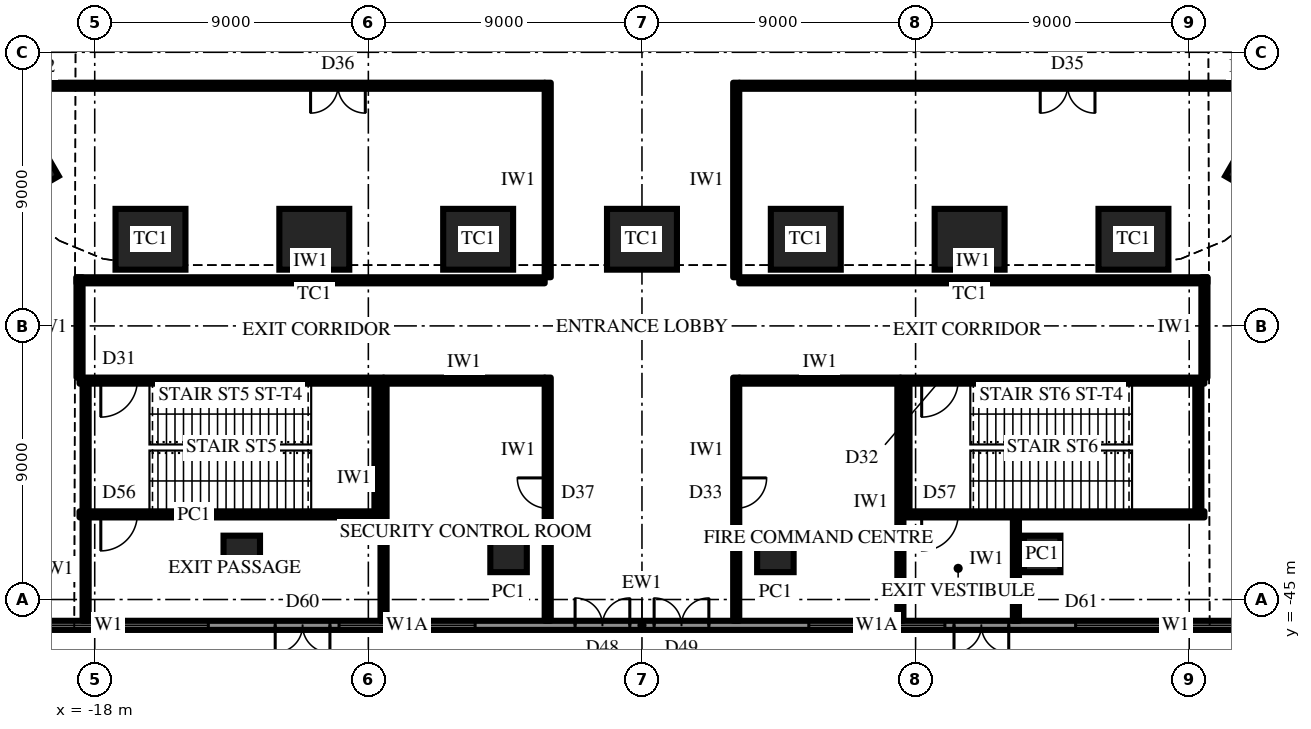
"""IFC4 building model, lengths in metres.
Left out: names, types, materials, properties, quantities, classifications, styles, units other than length and angle.
Written with IfcOpenShell. Run it as: python <this file> out.ifc"""

import sys

from ifc_helpers import new_model, si_unit, direction, frame, frame_2d, origin, origin_2d, place, context, subcontext, project, spatial, rectangle, extrude, element, fill, save


model = new_model("IFC4")
c1 = context("Model", 3, precision=1e-05, world=origin(), true_north=direction((0.0, 1.0)))
c2 = subcontext(c1, "Body", "Model", "MODEL_VIEW")
j1 = project(units=[si_unit("LENGTHUNIT", "METRE"), si_unit("PLANEANGLEUNIT", "RADIAN")], contexts=[c1])
p1 = place(None, origin())
s1 = spatial("IfcSite", under=j1, at=p1, CompositionType="ELEMENT")
p2 = place(p1, origin())
s2 = spatial("IfcBuilding", under=s1, at=p2, CompositionType="ELEMENT")
p3 = place(p2, origin())
s3 = spatial("IfcBuildingStorey", under=s2, at=p3, CompositionType="ELEMENT", Elevation=0.0)
for number, where, z_axis, x_axis in (
    (1, (-20.626, -30.575, 0.0), (0.0, 0.0, 1.0), (0.5, -0.866, 0.0)),
    (2, (-16.166, -33.15, 0.0), (0.0, 0.0, 1.0), (1.0, 0.0, 0.0)),
    (3, (-10.777, -33.15, 0.0), (0.0, 0.0, 1.0), (1.0, 0.0, 0.0)),
    (4, (-5.389, -33.15, 0.0), (0.0, 0.0, 1.0), (1.0, 0.0, 0.0)),
    (5, (0.0, -33.15, 0.0), (0.0, 0.0, 1.0), (1.0, 0.0, 0.0)),
    (6, (5.389, -33.15, 0.0), (0.0, 0.0, 1.0), (1.0, 0.0, 0.0)),
    (7, (10.777, -33.15, 0.0), (0.0, 0.0, 1.0), (1.0, 0.0, 0.0)),
    (8, (16.166, -33.15, 0.0), (0.0, 0.0, 1.0), (1.0, 0.0, 0.0)),
    (9, (20.626, -30.575, 0.0), (0.0, 0.0, 1.0), (0.5, 0.866, 0.0)),
):
    element("IfcColumn", number, at=place(p3, frame(where, z_axis=z_axis, x_axis=x_axis)), inside=s3, PredefinedType="COLUMN", context=c2, shape_type="SweptSolid", body=[
        extrude(rectangle(XDim=2.3, YDim=2.0, at=origin_2d()), origin(), (0.0, 0.0, 1.0), 7.0),
    ])
p4 = place(p3, frame((-18.5, -42.2, 0.0), z_axis=(0.0, 0.0, 1.0), x_axis=(1.0, 0.0, 0.0)))
e10 = element("IfcWall", 10, at=p4, inside=s3, PredefinedType="SHEAR", context=c2, shape_type="SweptSolid", body=[
    extrude(rectangle(XDim=10.0, YDim=0.2, at=frame_2d((5.0, 0.0))), origin(), (0.0, 0.0, 1.0), 7.0),
])
p5 = place(p4, frame((0.7, 0.0, 0.0)))
e11 = element("IfcOpeningElement", 11, at=p5, cuts=e10, PredefinedType="OPENING", context=c2, shape_type="SweptSolid", body=[
    extrude(rectangle(XDim=1.2, YDim=2.2, at=frame_2d((0.6, 1.1))), frame((0.0, 0.11, 0.0), z_axis=(0.0, -1.0, 0.0), x_axis=(1.0, 0.0, 0.0)), (0.0, 0.0, 1.0), 0.22),
])
p6 = place(p3, frame((-8.5, -37.8, 0.0), z_axis=(0.0, 0.0, 1.0), x_axis=(-1.0, 0.0, 0.0)))
e12 = element("IfcWall", 12, at=p6, inside=s3, PredefinedType="SHEAR", context=c2, shape_type="SweptSolid", body=[
    extrude(rectangle(XDim=10.0, YDim=0.2, at=frame_2d((5.0, 0.0))), origin(), (0.0, 0.0, 1.0), 7.0),
])
p7 = place(p6, frame((8.1, 0.0, 0.0)))
e13 = element("IfcOpeningElement", 13, at=p7, cuts=e12, PredefinedType="OPENING", context=c2, shape_type="SweptSolid", body=[
    extrude(rectangle(XDim=1.2, YDim=2.2, at=frame_2d((0.6, 1.1))), frame((0.0, 0.11, 0.0), z_axis=(0.0, -1.0, 0.0), x_axis=(1.0, 0.0, 0.0)), (0.0, 0.0, 1.0), 0.22),
])
for number, where, z_axis, x_axis in (
    (14, (-18.3, -37.9, 0.0), (0.0, 0.0, 1.0), (0.0, -1.0, 0.0)),
    (15, (-8.7, -42.1, 0.0), (0.0, 0.0, 1.0), (0.0, 1.0, 0.0)),
):
    element("IfcWall", number, at=place(p3, frame(where, z_axis=z_axis, x_axis=x_axis)), inside=s3, PredefinedType="SHEAR", context=c2, shape_type="SweptSolid", body=[
        extrude(rectangle(XDim=4.2, YDim=0.2, at=frame_2d((2.1, 0.0))), origin(), (0.0, 0.0, 1.0), 7.0),
    ])
p8 = place(p3, frame((8.5, -42.2, 0.0), z_axis=(0.0, 0.0, 1.0), x_axis=(1.0, 0.0, 0.0)))
e16 = element("IfcWall", 16, at=p8, inside=s3, PredefinedType="SHEAR", context=c2, shape_type="SweptSolid", body=[
    extrude(rectangle(XDim=10.0, YDim=0.2, at=frame_2d((5.0, 0.0))), origin(), (0.0, 0.0, 1.0), 7.0),
])
p9 = place(p8, frame((0.7, 0.0, 0.0)))
e17 = element("IfcOpeningElement", 17, at=p9, cuts=e16, PredefinedType="OPENING", context=c2, shape_type="SweptSolid", body=[
    extrude(rectangle(XDim=1.2, YDim=2.2, at=frame_2d((0.6, 1.1))), frame((0.0, 0.11, 0.0), z_axis=(0.0, -1.0, 0.0), x_axis=(1.0, 0.0, 0.0)), (0.0, 0.0, 1.0), 0.22),
])
p10 = place(p3, frame((18.5, -37.8, 0.0), z_axis=(0.0, 0.0, 1.0), x_axis=(-1.0, 0.0, 0.0)))
e18 = element("IfcWall", 18, at=p10, inside=s3, PredefinedType="SHEAR", context=c2, shape_type="SweptSolid", body=[
    extrude(rectangle(XDim=10.0, YDim=0.2, at=frame_2d((5.0, 0.0))), origin(), (0.0, 0.0, 1.0), 7.0),
])
p11 = place(p10, frame((8.1, 0.0, 0.0)))
e19 = element("IfcOpeningElement", 19, at=p11, cuts=e18, PredefinedType="OPENING", context=c2, shape_type="SweptSolid", body=[
    extrude(rectangle(XDim=1.2, YDim=2.2, at=frame_2d((0.6, 1.1))), frame((0.0, 0.11, 0.0), z_axis=(0.0, -1.0, 0.0), x_axis=(1.0, 0.0, 0.0)), (0.0, 0.0, 1.0), 0.22),
])
for number, where, z_axis, x_axis in (
    (20, (8.7, -37.9, 0.0), (0.0, 0.0, 1.0), (0.0, -1.0, 0.0)),
    (21, (18.3, -42.1, 0.0), (0.0, 0.0, 1.0), (0.0, 1.0, 0.0)),
):
    element("IfcWall", number, at=place(p3, frame(where, z_axis=z_axis, x_axis=x_axis)), inside=s3, PredefinedType="SHEAR", context=c2, shape_type="SweptSolid", body=[
        extrude(rectangle(XDim=4.2, YDim=0.2, at=frame_2d((2.1, 0.0))), origin(), (0.0, 0.0, 1.0), 7.0),
    ])
for number, where, z_axis, x_axis in (
    (22, (-13.164, -43.5, 0.0), (0.0, 0.0, 1.0), (1.0, 0.0, 0.0)),
    (23, (-4.388, -43.5, 0.0), (0.0, 0.0, 1.0), (1.0, 0.0, 0.0)),
    (24, (4.388, -43.5, 0.0), (0.0, 0.0, 1.0), (1.0, 0.0, 0.0)),
    (25, (13.164, -43.5, 0.0), (0.0, 0.0, 1.0), (1.0, 0.0, 0.0)),
):
    element("IfcColumn", number, at=place(p3, frame(where, z_axis=z_axis, x_axis=x_axis)), inside=s3, PredefinedType="COLUMN", context=c2, shape_type="SweptSolid", body=[
        extrude(rectangle(XDim=1.2, YDim=1.2, at=origin_2d()), origin(), (0.0, 0.0, 1.0), 7.0),
    ])
p12 = place(p3, frame((-21.939, -45.85, 0.0), z_axis=(0.0, 0.0, 1.0), x_axis=(1.0, 0.0, 0.0)))
e26 = element("IfcWall", 26, at=p12, inside=s3, PredefinedType="SOLIDWALL", context=c2, shape_type="SweptSolid", body=[
    extrude(rectangle(XDim=43.878, YDim=0.3, at=frame_2d((21.939, 0.0))), origin(), (0.0, 0.0, 1.0), 6.65),
])
p13 = place(p12, frame((1.1, 0.0, 0.3)))
e27 = element("IfcOpeningElement", 27, at=p13, cuts=e26, PredefinedType="OPENING", context=c2, shape_type="SweptSolid", body=[
    extrude(rectangle(XDim=6.576, YDim=5.0, at=frame_2d((3.288, 2.5))), frame((0.0, 0.16, 0.0), z_axis=(0.0, -1.0, 0.0), x_axis=(1.0, 0.0, 0.0)), (0.0, 0.0, 1.0), 0.32),
])
p14 = place(p12, frame((9.875, 0.0, 0.0)))
e28 = element("IfcOpeningElement", 28, at=p14, cuts=e26, PredefinedType="OPENING", context=c2, shape_type="SweptSolid", body=[
    extrude(rectangle(XDim=1.8, YDim=2.4, at=frame_2d((0.9, 1.2))), frame((0.0, 0.16, 0.0), z_axis=(0.0, -1.0, 0.0), x_axis=(1.0, 0.0, 0.0)), (0.0, 0.0, 1.0), 0.32),
])
p15 = place(p12, frame((11.976, 0.0, 0.3)))
e29 = element("IfcOpeningElement", 29, at=p15, cuts=e26, PredefinedType="OPENING", context=c2, shape_type="SweptSolid", body=[
    extrude(rectangle(XDim=4.476, YDim=5.0, at=frame_2d((2.238, 2.5))), frame((0.0, 0.16, 0.0), z_axis=(0.0, -1.0, 0.0), x_axis=(1.0, 0.0, 0.0)), (0.0, 0.0, 1.0), 0.32),
])
p16 = place(p12, frame((19.739, 0.0, 0.0)))
e30 = element("IfcOpeningElement", 30, at=p16, cuts=e26, PredefinedType="OPENING", context=c2, shape_type="SweptSolid", body=[
    extrude(rectangle(XDim=1.8, YDim=2.7, at=frame_2d((0.9, 1.35))), frame((0.0, 0.16, 0.0), z_axis=(0.0, -1.0, 0.0), x_axis=(1.0, 0.0, 0.0)), (0.0, 0.0, 1.0), 0.32),
])
p17 = place(p12, frame((22.339, 0.0, 0.0)))
e31 = element("IfcOpeningElement", 31, at=p17, cuts=e26, PredefinedType="OPENING", context=c2, shape_type="SweptSolid", body=[
    extrude(rectangle(XDim=1.8, YDim=2.7, at=frame_2d((0.9, 1.35))), frame((0.0, 0.16, 0.0), z_axis=(0.0, -1.0, 0.0), x_axis=(1.0, 0.0, 0.0)), (0.0, 0.0, 1.0), 0.32),
])
p18 = place(p12, frame((32.203, 0.0, 0.0)))
e32 = element("IfcOpeningElement", 32, at=p18, cuts=e26, PredefinedType="OPENING", context=c2, shape_type="SweptSolid", body=[
    extrude(rectangle(XDim=1.8, YDim=2.4, at=frame_2d((0.9, 1.2))), frame((0.0, 0.16, 0.0), z_axis=(0.0, -1.0, 0.0), x_axis=(1.0, 0.0, 0.0)), (0.0, 0.0, 1.0), 0.32),
])
p19 = place(p12, frame((27.427, 0.0, 0.3)))
e33 = element("IfcOpeningElement", 33, at=p19, cuts=e26, PredefinedType="OPENING", context=c2, shape_type="SweptSolid", body=[
    extrude(rectangle(XDim=4.476, YDim=5.0, at=frame_2d((2.238, 2.5))), frame((0.0, 0.16, 0.0), z_axis=(0.0, -1.0, 0.0), x_axis=(1.0, 0.0, 0.0)), (0.0, 0.0, 1.0), 0.32),
])
p20 = place(p12, frame((36.203, 0.0, 0.3)))
e34 = element("IfcOpeningElement", 34, at=p20, cuts=e26, PredefinedType="OPENING", context=c2, shape_type="SweptSolid", body=[
    extrude(rectangle(XDim=6.576, YDim=5.0, at=frame_2d((3.288, 2.5))), frame((0.0, 0.16, 0.0), z_axis=(0.0, -1.0, 0.0), x_axis=(1.0, 0.0, 0.0)), (0.0, 0.0, 1.0), 0.32),
])
p21 = place(p3, frame((-36.546, -28.1, 0.0), z_axis=(0.0, 0.0, 1.0), x_axis=(1.0, 0.0, 0.0)))
e35 = element("IfcWall", 35, at=p21, inside=s3, PredefinedType="PARTITIONING", context=c2, shape_type="SweptSolid", body=[
    extrude(rectangle(XDim=33.346, YDim=0.2, at=frame_2d((16.673, 0.0))), origin(), (0.0, 0.0, 1.0), 6.65),
])
p22 = place(p21, frame((25.646, 0.0, 0.0)))
e36 = element("IfcOpeningElement", 36, at=p22, cuts=e35, PredefinedType="OPENING", context=c2, shape_type="SweptSolid", body=[
    extrude(rectangle(XDim=1.8, YDim=2.4, at=frame_2d((0.9, 1.2))), frame((0.0, 0.11, 0.0), z_axis=(0.0, -1.0, 0.0), x_axis=(1.0, 0.0, 0.0)), (0.0, 0.0, 1.0), 0.22),
])
p23 = place(p3, frame((3.2, -28.1, 0.0), z_axis=(0.0, 0.0, 1.0), x_axis=(1.0, 0.0, 0.0)))
e37 = element("IfcWall", 37, at=p23, inside=s3, PredefinedType="PARTITIONING", context=c2, shape_type="SweptSolid", body=[
    extrude(rectangle(XDim=33.346, YDim=0.2, at=frame_2d((16.673, 0.0))), origin(), (0.0, 0.0, 1.0), 6.65),
])
p24 = place(p23, frame((9.9, 0.0, 0.0)))
e38 = element("IfcOpeningElement", 38, at=p24, cuts=e37, PredefinedType="OPENING", context=c2, shape_type="SweptSolid", body=[
    extrude(rectangle(XDim=1.8, YDim=2.4, at=frame_2d((0.9, 1.2))), frame((0.0, 0.11, 0.0), z_axis=(0.0, -1.0, 0.0), x_axis=(1.0, 0.0, 0.0)), (0.0, 0.0, 1.0), 0.22),
])
p25 = place(p3, frame((-3.1, -45.7, 0.0), z_axis=(0.0, 0.0, 1.0), x_axis=(0.0, 1.0, 0.0)))
e39 = element("IfcWall", 39, at=p25, inside=s3, PredefinedType="PARTITIONING", context=c2, shape_type="SweptSolid", body=[
    extrude(rectangle(XDim=8.0, YDim=0.2, at=frame_2d((4.0, 0.0))), origin(), (0.0, 0.0, 1.0), 6.65),
])
p26 = place(p25, frame((3.7, 0.0, 0.0)))
e40 = element("IfcOpeningElement", 40, at=p26, cuts=e39, PredefinedType="OPENING", context=c2, shape_type="SweptSolid", body=[
    extrude(rectangle(XDim=1.0, YDim=2.2, at=frame_2d((0.5, 1.1))), frame((0.0, 0.11, 0.0), z_axis=(0.0, -1.0, 0.0), x_axis=(1.0, 0.0, 0.0)), (0.0, 0.0, 1.0), 0.22),
])
p27 = place(p3, frame((3.1, -45.7, 0.0), z_axis=(0.0, 0.0, 1.0), x_axis=(0.0, 1.0, 0.0)))
e41 = element("IfcWall", 41, at=p27, inside=s3, PredefinedType="PARTITIONING", context=c2, shape_type="SweptSolid", body=[
    extrude(rectangle(XDim=8.0, YDim=0.2, at=frame_2d((4.0, 0.0))), origin(), (0.0, 0.0, 1.0), 6.65),
])
p28 = place(p27, frame((3.7, 0.0, 0.0)))
e42 = element("IfcOpeningElement", 42, at=p28, cuts=e41, PredefinedType="OPENING", context=c2, shape_type="SweptSolid", body=[
    extrude(rectangle(XDim=1.0, YDim=2.2, at=frame_2d((0.5, 1.1))), frame((0.0, 0.11, 0.0), z_axis=(0.0, -1.0, 0.0), x_axis=(1.0, 0.0, 0.0)), (0.0, 0.0, 1.0), 0.22),
])
for number, where, z_axis, x_axis in (
    (43, (-3.1, -34.4, 0.0), (0.0, 0.0, 1.0), (0.0, 1.0, 0.0)),
    (44, (3.1, -34.4, 0.0), (0.0, 0.0, 1.0), (0.0, 1.0, 0.0)),
):
    element("IfcWall", number, at=place(p3, frame(where, z_axis=z_axis, x_axis=x_axis)), inside=s3, PredefinedType="PARTITIONING", context=c2, shape_type="SweptSolid", body=[
        extrude(rectangle(XDim=6.4, YDim=0.2, at=frame_2d((3.2, 0.0))), origin(), (0.0, 0.0, 1.0), 6.65),
    ])
for number, where, z_axis, x_axis in (
    (45, (-18.6, -34.5, 0.0), (0.0, 0.0, 1.0), (1.0, 0.0, 0.0)),
    (46, (3.2, -34.5, 0.0), (0.0, 0.0, 1.0), (1.0, 0.0, 0.0)),
):
    element("IfcWall", number, at=place(p3, frame(where, z_axis=z_axis, x_axis=x_axis)), inside=s3, PredefinedType="PARTITIONING", context=c2, shape_type="SweptSolid", body=[
        extrude(rectangle(XDim=15.4, YDim=0.2, at=frame_2d((7.7, 0.0))), origin(), (0.0, 0.0, 1.0), 6.65),
    ])
for number, where, z_axis, x_axis in (
    (47, (-18.5, -37.7, 0.0), (0.0, 0.0, 1.0), (0.0, 1.0, 0.0)),
    (48, (18.5, -37.7, 0.0), (0.0, 0.0, 1.0), (0.0, 1.0, 0.0)),
):
    element("IfcWall", number, at=place(p3, frame(where, z_axis=z_axis, x_axis=x_axis)), inside=s3, PredefinedType="PARTITIONING", context=c2, shape_type="SweptSolid", body=[
        extrude(rectangle(XDim=3.3, YDim=0.2, at=frame_2d((1.65, 0.0))), origin(), (0.0, 0.0, 1.0), 6.65),
    ])
for number, where, z_axis, x_axis in (
    (49, (-8.5, -37.8, 0.0), (0.0, 0.0, 1.0), (1.0, 0.0, 0.0)),
    (50, (3.2, -37.8, 0.0), (0.0, 0.0, 1.0), (1.0, 0.0, 0.0)),
):
    element("IfcWall", number, at=place(p3, frame(where, z_axis=z_axis, x_axis=x_axis)), inside=s3, PredefinedType="PARTITIONING", context=c2, shape_type="SweptSolid", body=[
        extrude(rectangle(XDim=5.3, YDim=0.2, at=frame_2d((2.65, 0.0))), origin(), (0.0, 0.0, 1.0), 6.65),
    ])
for number, where, z_axis, x_axis in (
    (51, (-8.5, -45.7, 0.0), (0.0, 0.0, 1.0), (0.0, 1.0, 0.0)),
    (52, (8.5, -45.7, 0.0), (0.0, 0.0, 1.0), (0.0, 1.0, 0.0)),
):
    element("IfcWall", number, at=place(p3, frame(where, z_axis=z_axis, x_axis=x_axis)), inside=s3, PredefinedType="PARTITIONING", context=c2, shape_type="SweptSolid", body=[
        extrude(rectangle(XDim=7.8, YDim=0.2, at=frame_2d((3.9, 0.0))), origin(), (0.0, 0.0, 1.0), 6.65),
    ])
for number, where, z_axis, x_axis in (
    (53, (-18.3, -45.7, 0.0), (0.0, 0.0, 1.0), (0.0, 1.0, 0.0)),
    (54, (12.3, -45.7, 0.0), (0.0, 0.0, 1.0), (0.0, 1.0, 0.0)),
):
    element("IfcWall", number, at=place(p3, frame(where, z_axis=z_axis, x_axis=x_axis)), inside=s3, PredefinedType="PARTITIONING", context=c2, shape_type="SweptSolid", body=[
        extrude(rectangle(XDim=3.4, YDim=0.2, at=frame_2d((1.7, 0.0))), origin(), (0.0, 0.0, 1.0), 6.65),
    ])
p29 = place(p13, origin())
e55 = element("IfcWindow", 55, at=p29, inside=s3, PartitioningType="SINGLE_PANEL", PredefinedType="WINDOW", context=c2, shape_type="SweptSolid", body=[
    extrude(rectangle(XDim=6.576, YDim=5.0, at=frame_2d((3.288, 2.5))), frame((0.0, 0.03, 0.0), z_axis=(0.0, -1.0, 0.0), x_axis=(1.0, 0.0, 0.0)), (0.0, 0.0, 1.0), 0.06),
])
fill(e27, e55)
p30 = place(p14, frame((1.8, 0.0, 0.0), z_axis=(0.0, 0.0, 1.0), x_axis=(-1.0, 0.0, 0.0)))
e56 = element("IfcDoor", 56, at=p30, inside=s3, OperationType="DOUBLE_DOOR_SINGLE_SWING", PredefinedType="DOOR", context=c2, shape_type="SweptSolid", body=[
    extrude(rectangle(XDim=1.8, YDim=2.4, at=frame_2d((0.9, 1.2))), frame((0.0, 0.025, 0.0), z_axis=(0.0, -1.0, 0.0), x_axis=(1.0, 0.0, 0.0)), (0.0, 0.0, 1.0), 0.05),
])
fill(e28, e56)
p31 = place(p15, origin())
e57 = element("IfcWindow", 57, at=p31, inside=s3, PartitioningType="SINGLE_PANEL", PredefinedType="WINDOW", context=c2, shape_type="SweptSolid", body=[
    extrude(rectangle(XDim=4.476, YDim=5.0, at=frame_2d((2.238, 2.5))), frame((0.0, 0.03, 0.0), z_axis=(0.0, -1.0, 0.0), x_axis=(1.0, 0.0, 0.0)), (0.0, 0.0, 1.0), 0.06),
])
fill(e29, e57)
p32 = place(p16, origin())
e58 = element("IfcDoor", 58, at=p32, inside=s3, OperationType="DOUBLE_DOOR_SINGLE_SWING", PredefinedType="DOOR", context=c2, shape_type="SweptSolid", body=[
    extrude(rectangle(XDim=1.8, YDim=2.7, at=frame_2d((0.9, 1.35))), frame((0.0, 0.025, 0.0), z_axis=(0.0, -1.0, 0.0), x_axis=(1.0, 0.0, 0.0)), (0.0, 0.0, 1.0), 0.05),
])
fill(e30, e58)
p33 = place(p17, origin())
e59 = element("IfcDoor", 59, at=p33, inside=s3, OperationType="DOUBLE_DOOR_SINGLE_SWING", PredefinedType="DOOR", context=c2, shape_type="SweptSolid", body=[
    extrude(rectangle(XDim=1.8, YDim=2.7, at=frame_2d((0.9, 1.35))), frame((0.0, 0.025, 0.0), z_axis=(0.0, -1.0, 0.0), x_axis=(1.0, 0.0, 0.0)), (0.0, 0.0, 1.0), 0.05),
])
fill(e31, e59)
p34 = place(p18, frame((1.8, 0.0, 0.0), z_axis=(0.0, 0.0, 1.0), x_axis=(-1.0, 0.0, 0.0)))
e60 = element("IfcDoor", 60, at=p34, inside=s3, OperationType="DOUBLE_DOOR_SINGLE_SWING", PredefinedType="DOOR", context=c2, shape_type="SweptSolid", body=[
    extrude(rectangle(XDim=1.8, YDim=2.4, at=frame_2d((0.9, 1.2))), frame((0.0, 0.025, 0.0), z_axis=(0.0, -1.0, 0.0), x_axis=(1.0, 0.0, 0.0)), (0.0, 0.0, 1.0), 0.05),
])
fill(e32, e60)
p35 = place(p19, origin())
e61 = element("IfcWindow", 61, at=p35, inside=s3, PartitioningType="SINGLE_PANEL", PredefinedType="WINDOW", context=c2, shape_type="SweptSolid", body=[
    extrude(rectangle(XDim=4.476, YDim=5.0, at=frame_2d((2.238, 2.5))), frame((0.0, 0.03, 0.0), z_axis=(0.0, -1.0, 0.0), x_axis=(1.0, 0.0, 0.0)), (0.0, 0.0, 1.0), 0.06),
])
fill(e33, e61)
p36 = place(p20, origin())
e62 = element("IfcWindow", 62, at=p36, inside=s3, PartitioningType="SINGLE_PANEL", PredefinedType="WINDOW", context=c2, shape_type="SweptSolid", body=[
    extrude(rectangle(XDim=6.576, YDim=5.0, at=frame_2d((3.288, 2.5))), frame((0.0, 0.03, 0.0), z_axis=(0.0, -1.0, 0.0), x_axis=(1.0, 0.0, 0.0)), (0.0, 0.0, 1.0), 0.06),
])
fill(e34, e62)
p37 = place(p28, frame((1.0, 0.0, 0.0), z_axis=(0.0, 0.0, 1.0), x_axis=(-1.0, 0.0, 0.0)))
e63 = element("IfcDoor", 63, at=p37, inside=s3, OperationType="SINGLE_SWING_RIGHT", PredefinedType="DOOR", context=c2, shape_type="SweptSolid", body=[
    extrude(rectangle(XDim=1.0, YDim=2.2, at=frame_2d((0.5, 1.1))), frame((0.0, 0.025, 0.0), z_axis=(0.0, -1.0, 0.0), x_axis=(1.0, 0.0, 0.0)), (0.0, 0.0, 1.0), 0.05),
])
fill(e42, e63)
p38 = place(p26, origin())
e64 = element("IfcDoor", 64, at=p38, inside=s3, OperationType="SINGLE_SWING_LEFT", PredefinedType="DOOR", context=c2, shape_type="SweptSolid", body=[
    extrude(rectangle(XDim=1.0, YDim=2.2, at=frame_2d((0.5, 1.1))), frame((0.0, 0.025, 0.0), z_axis=(0.0, -1.0, 0.0), x_axis=(1.0, 0.0, 0.0)), (0.0, 0.0, 1.0), 0.05),
])
fill(e40, e64)
p39 = place(p22, frame((1.8, 0.0, 0.0), z_axis=(0.0, 0.0, 1.0), x_axis=(-1.0, 0.0, 0.0)))
e65 = element("IfcDoor", 65, at=p39, inside=s3, OperationType="DOUBLE_DOOR_SINGLE_SWING", PredefinedType="DOOR", context=c2, shape_type="SweptSolid", body=[
    extrude(rectangle(XDim=1.8, YDim=2.4, at=frame_2d((0.9, 1.2))), frame((0.0, 0.025, 0.0), z_axis=(0.0, -1.0, 0.0), x_axis=(1.0, 0.0, 0.0)), (0.0, 0.0, 1.0), 0.05),
])
fill(e36, e65)
p40 = place(p24, frame((1.8, 0.0, 0.0), z_axis=(0.0, 0.0, 1.0), x_axis=(-1.0, 0.0, 0.0)))
e66 = element("IfcDoor", 66, at=p40, inside=s3, OperationType="DOUBLE_DOOR_SINGLE_SWING", PredefinedType="DOOR", context=c2, shape_type="SweptSolid", body=[
    extrude(rectangle(XDim=1.8, YDim=2.4, at=frame_2d((0.9, 1.2))), frame((0.0, 0.025, 0.0), z_axis=(0.0, -1.0, 0.0), x_axis=(1.0, 0.0, 0.0)), (0.0, 0.0, 1.0), 0.05),
])
fill(e38, e66)
p41 = place(p7, origin())
e67 = element("IfcDoor", 67, at=p41, inside=s3, OperationType="SINGLE_SWING_LEFT", PredefinedType="DOOR", context=c2, shape_type="SweptSolid", body=[
    extrude(rectangle(XDim=1.2, YDim=2.2, at=frame_2d((0.6, 1.1))), frame((0.0, 0.025, 0.0), z_axis=(0.0, -1.0, 0.0), x_axis=(1.0, 0.0, 0.0)), (0.0, 0.0, 1.0), 0.05),
])
fill(e13, e67)
p42 = place(p5, frame((1.2, 0.0, 0.0), z_axis=(0.0, 0.0, 1.0), x_axis=(-1.0, 0.0, 0.0)))
e68 = element("IfcDoor", 68, at=p42, inside=s3, OperationType="SINGLE_SWING_LEFT", PredefinedType="DOOR", context=c2, shape_type="SweptSolid", body=[
    extrude(rectangle(XDim=1.2, YDim=2.2, at=frame_2d((0.6, 1.1))), frame((0.0, 0.025, 0.0), z_axis=(0.0, -1.0, 0.0), x_axis=(1.0, 0.0, 0.0)), (0.0, 0.0, 1.0), 0.05),
])
fill(e11, e68)
p43 = place(p11, origin())
e69 = element("IfcDoor", 69, at=p43, inside=s3, OperationType="SINGLE_SWING_LEFT", PredefinedType="DOOR", context=c2, shape_type="SweptSolid", body=[
    extrude(rectangle(XDim=1.2, YDim=2.2, at=frame_2d((0.6, 1.1))), frame((0.0, 0.025, 0.0), z_axis=(0.0, -1.0, 0.0), x_axis=(1.0, 0.0, 0.0)), (0.0, 0.0, 1.0), 0.05),
])
fill(e19, e69)
p44 = place(p9, frame((1.2, 0.0, 0.0), z_axis=(0.0, 0.0, 1.0), x_axis=(-1.0, 0.0, 0.0)))
e70 = element("IfcDoor", 70, at=p44, inside=s3, OperationType="SINGLE_SWING_LEFT", PredefinedType="DOOR", context=c2, shape_type="SweptSolid", body=[
    extrude(rectangle(XDim=1.2, YDim=2.2, at=frame_2d((0.6, 1.1))), frame((0.0, 0.025, 0.0), z_axis=(0.0, -1.0, 0.0), x_axis=(1.0, 0.0, 0.0)), (0.0, 0.0, 1.0), 0.05),
])
fill(e17, e70)
save(model, sys.argv[1])
